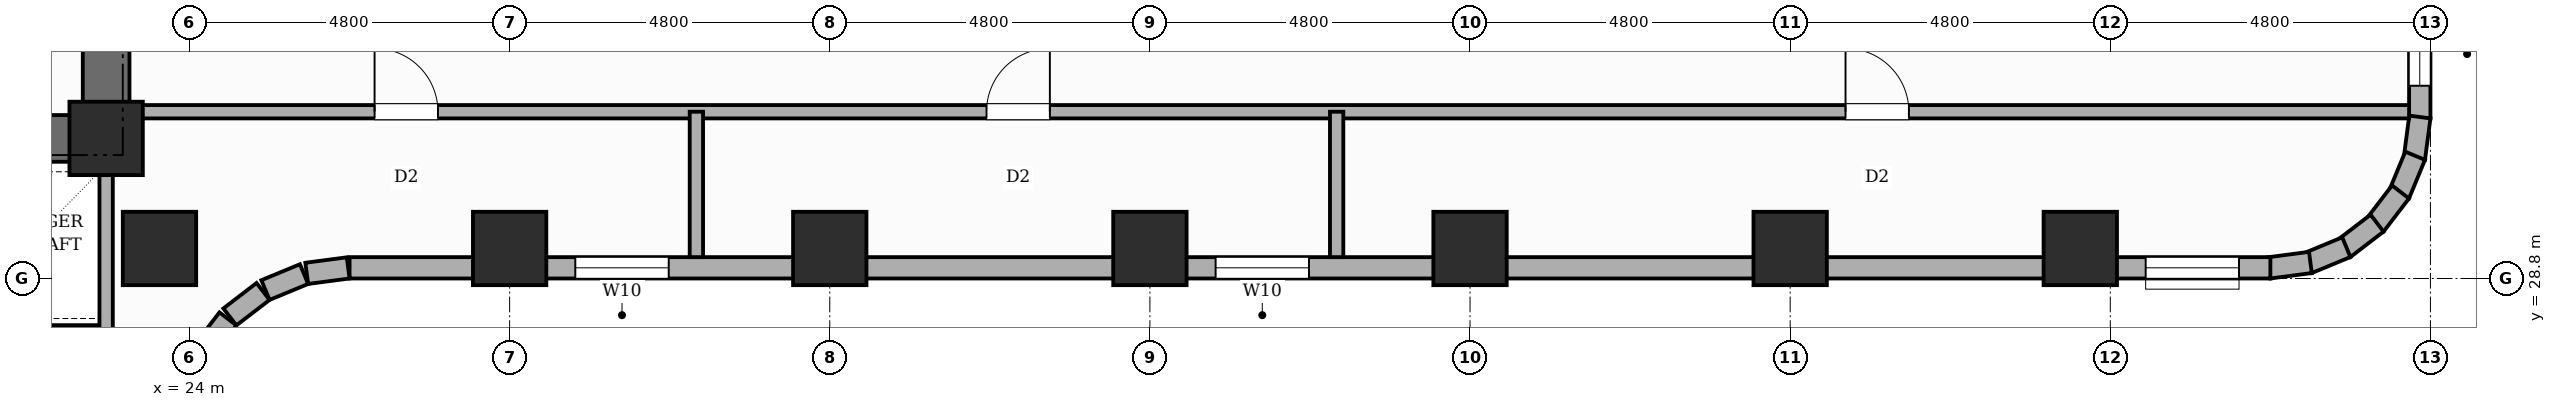
"""IFC4 building model, lengths in metres.
Left out: names, types, materials, properties, quantities, classifications, styles, units other than length and angle.
Written with IfcOpenShell. Run it as: python <this file> out.ifc"""

import sys

from ifc_helpers import new_model, si_unit, direction, frame, frame_2d, origin, origin_2d, place, context, subcontext, project, spatial, rectangle, extrude, element, fill, save


model = new_model("IFC4")
c1 = context("Model", 3, precision=1e-05, world=origin(), true_north=direction((0.0, 1.0)))
c2 = subcontext(c1, "Body", "Model", "MODEL_VIEW")
j1 = project(units=[si_unit("LENGTHUNIT", "METRE"), si_unit("PLANEANGLEUNIT", "RADIAN")], contexts=[c1])
p1 = place(None, origin())
s1 = spatial("IfcSite", under=j1, at=p1, CompositionType="ELEMENT")
p2 = place(p1, origin())
s2 = spatial("IfcBuilding", under=s1, at=p2, CompositionType="ELEMENT")
p3 = place(p2, frame((0.0, 0.0, 57.4)))
s3 = spatial("IfcBuildingStorey", under=s2, at=p3, CompositionType="ELEMENT", Elevation=57.4)
p4 = place(p3, frame((22.75, 30.55, 0.0), z_axis=(0.0, 0.0, 1.0), x_axis=(0.0, 1.0, 0.0)))
e1 = element("IfcWall", 1, at=p4, inside=s3, PredefinedType="SHEAR", context=c2, shape_type="SweptSolid", body=[
    extrude(rectangle(XDim=15.6, YDim=0.7, at=frame_2d((7.8, 0.0))), origin(), (0.0, 0.0, 1.0), 3.6),
])
p5 = place(p4, frame((10.8, 0.0, 0.0)))
e2 = element("IfcOpeningElement", 2, at=p5, cuts=e1, PredefinedType="OPENING", context=c2, shape_type="SweptSolid", body=[
    extrude(rectangle(XDim=1.0, YDim=2.15, at=frame_2d((0.5, 1.075))), frame((0.0, 0.36, 0.0), z_axis=(0.0, -1.0, 0.0), x_axis=(1.0, 0.0, 0.0)), (0.0, 0.0, 1.0), 0.72),
])
p6 = place(p3, frame((18.84, 30.9, 0.0), z_axis=(0.0, 0.0, 1.0), x_axis=(1.0, 0.0, 0.0)))
e3 = element("IfcWall", 3, at=p6, inside=s3, PredefinedType="SHEAR", context=c2, shape_type="SweptSolid", body=[
    extrude(rectangle(XDim=3.91, YDim=0.7, at=frame_2d((1.955, 0.0))), origin(), (0.0, 0.0, 1.0), 3.6),
])
for number, where, z_axis, x_axis in (
    (4, (22.75, 30.9, 0.0), (0.0, 0.0, 1.0), (1.0, 0.0, 0.0)),
    (5, (23.55, 29.25, 0.0), (0.0, 0.0, 1.0), (1.0, 0.0, 0.0)),
    (6, (28.8, 29.25, 0.0), (0.0, 0.0, 1.0), (1.0, 0.0, 0.0)),
    (7, (33.6, 29.25, 0.0), (0.0, 0.0, 1.0), (1.0, 0.0, 0.0)),
    (8, (38.4, 29.25, 0.0), (0.0, 0.0, 1.0), (1.0, 0.0, 0.0)),
    (9, (43.2, 29.25, 0.0), (0.0, 0.0, 1.0), (1.0, 0.0, 0.0)),
    (10, (48.0, 29.25, 0.0), (0.0, 0.0, 1.0), (1.0, 0.0, 0.0)),
    (11, (52.35, 29.25, 0.0), (0.0, 0.0, 1.0), (1.0, 0.0, 0.0)),
):
    element("IfcColumn", number, at=place(p3, frame(where, z_axis=z_axis, x_axis=x_axis)), inside=s3, PredefinedType="COLUMN", context=c2, shape_type="SweptSolid", body=[
        extrude(rectangle(XDim=1.1, YDim=1.1, at=origin_2d()), origin(), (0.0, 0.0, 1.0), 3.6),
    ])
p7 = place(p3, frame((57.44, 45.6, 0.0), z_axis=(0.0, 0.0, 1.0), x_axis=(0.0, -1.0, 0.0)))
e12 = element("IfcWall", 12, at=p7, inside=s3, PredefinedType="STANDARD", context=c2, shape_type="SweptSolid", body=[
    extrude(rectangle(XDim=14.4, YDim=0.32, at=frame_2d((7.2, 0.0))), origin(), (0.0, 0.0, 1.0), 2.53),
])
p8 = place(p7, frame((3.75, 0.0, 0.0)))
e13 = element("IfcOpeningElement", 13, at=p8, cuts=e12, PredefinedType="OPENING", context=c2, shape_type="SweptSolid", body=[
    extrude(rectangle(XDim=1.1, YDim=2.15, at=frame_2d((0.55, 1.075))), frame((0.0, 0.17, 0.0), z_axis=(0.0, -1.0, 0.0), x_axis=(1.0, 0.0, 0.0)), (0.0, 0.0, 1.0), 0.34),
])
p9 = place(p7, frame((0.47, 0.0, 0.45)))
e14 = element("IfcOpeningElement", 14, at=p9, cuts=e12, PredefinedType="OPENING", context=c2, shape_type="SweptSolid", body=[
    extrude(rectangle(XDim=0.95, YDim=1.8, at=frame_2d((0.475, 0.9))), frame((0.0, 0.17, 0.0), z_axis=(0.0, -1.0, 0.0), x_axis=(1.0, 0.0, 0.0)), (0.0, 0.0, 1.0), 0.34),
])
p10 = place(p7, frame((12.96, 0.0, 0.45)))
e15 = element("IfcOpeningElement", 15, at=p10, cuts=e12, PredefinedType="OPENING", context=c2, shape_type="SweptSolid", body=[
    extrude(rectangle(XDim=0.95, YDim=1.8, at=frame_2d((0.475, 0.9))), frame((0.0, 0.17, 0.0), z_axis=(0.0, -1.0, 0.0), x_axis=(1.0, 0.0, 0.0)), (0.0, 0.0, 1.0), 0.34),
])
p11 = place(p7, frame((9.312, 0.0, 0.65)))
e16 = element("IfcOpeningElement", 16, at=p11, cuts=e12, PredefinedType="OPENING", context=c2, shape_type="SweptSolid", body=[
    extrude(rectangle(XDim=1.4, YDim=1.1, at=frame_2d((0.7, 0.55))), frame((0.0, 0.17, 0.0), z_axis=(0.0, -1.0, 0.0), x_axis=(1.0, 0.0, 0.0)), (0.0, 0.0, 1.0), 0.34),
])
p12 = place(p7, frame((5.407, 0.0, 0.45)))
e17 = element("IfcOpeningElement", 17, at=p12, cuts=e12, PredefinedType="OPENING", context=c2, shape_type="SweptSolid", body=[
    extrude(rectangle(XDim=0.95, YDim=1.8, at=frame_2d((0.475, 0.9))), frame((0.0, 0.17, 0.0), z_axis=(0.0, -1.0, 0.0), x_axis=(1.0, 0.0, 0.0)), (0.0, 0.0, 1.0), 0.34),
])
p13 = place(p3, frame((57.441, 31.221, 0.0), z_axis=(0.0, 0.0, 1.0), x_axis=(-0.130504898859, -0.991447664465, 0.0)))
e18 = element("IfcWall", 18, at=p13, inside=s3, PredefinedType="STANDARD", context=c2, shape_type="SweptSolid", body=[
    extrude(rectangle(XDim=0.627, YDim=0.32, at=frame_2d((0.313, 0.0))), origin(), (0.0, 0.0, 1.0), 3.35),
])
p14 = place(p3, frame((57.37, 30.64, 0.0), z_axis=(0.0, 0.0, 1.0), x_axis=(-0.382787856107, -0.923836271867, 0.0)))
e19 = element("IfcWall", 19, at=p14, inside=s3, PredefinedType="STANDARD", context=c2, shape_type="SweptSolid", body=[
    extrude(rectangle(XDim=0.626, YDim=0.32, at=frame_2d((0.313, 0.0))), origin(), (0.0, 0.0, 1.0), 3.35),
])
p15 = place(p3, frame((57.152, 30.097, 0.0), z_axis=(0.0, 0.0, 1.0), x_axis=(-0.608693302629, -0.793405610854, 0.0)))
e20 = element("IfcWall", 20, at=p15, inside=s3, PredefinedType="STANDARD", context=c2, shape_type="SweptSolid", body=[
    extrude(rectangle(XDim=0.626, YDim=0.32, at=frame_2d((0.313, 0.0))), origin(), (0.0, 0.0, 1.0), 3.35),
])
p16 = place(p3, frame((56.8, 29.63, 0.0), z_axis=(0.0, 0.0, 1.0), x_axis=(-0.793361818833, -0.608750379399, 0.0)))
e21 = element("IfcWall", 21, at=p16, inside=s3, PredefinedType="STANDARD", context=c2, shape_type="SweptSolid", body=[
    extrude(rectangle(XDim=0.627, YDim=0.32, at=frame_2d((0.313, 0.0))), origin(), (0.0, 0.0, 1.0), 3.35),
])
for number, where, z_axis, x_axis in (
    (22, (56.339, 29.269, 0.0), (0.0, 0.0, 1.0), (-0.924, -0.383, 0.0)),
    (23, (55.8, 29.04, 0.0), (0.0, 0.0, 1.0), (-0.991, -0.131, 0.0)),
):
    element("IfcWall", number, at=place(p3, frame(where, z_axis=z_axis, x_axis=x_axis)), inside=s3, PredefinedType="STANDARD", context=c2, shape_type="SweptSolid", body=[
        extrude(rectangle(XDim=0.626, YDim=0.32, at=frame_2d((0.313, 0.0))), origin(), (0.0, 0.0, 1.0), 3.35),
    ])
p17 = place(p3, frame((55.2, 28.96, 0.0), z_axis=(0.0, 0.0, 1.0), x_axis=(-1.0, 0.0, 0.0)))
e24 = element("IfcWall", 24, at=p17, inside=s3, PredefinedType="STANDARD", context=c2, shape_type="SweptSolid", body=[
    extrude(rectangle(XDim=28.8, YDim=0.32, at=frame_2d((14.4, 0.0))), origin(), (0.0, 0.0, 1.0), 2.53),
])
p18 = place(p17, frame((24.015, 0.0, 0.65)))
e25 = element("IfcOpeningElement", 25, at=p18, cuts=e24, PredefinedType="OPENING", context=c2, shape_type="SweptSolid", body=[
    extrude(rectangle(XDim=1.4, YDim=1.1, at=frame_2d((0.7, 0.55))), frame((0.0, 0.17, 0.0), z_axis=(0.0, -1.0, 0.0), x_axis=(1.0, 0.0, 0.0)), (0.0, 0.0, 1.0), 0.34),
])
p19 = place(p17, frame((14.415, 0.0, 0.65)))
e26 = element("IfcOpeningElement", 26, at=p19, cuts=e24, PredefinedType="OPENING", context=c2, shape_type="SweptSolid", body=[
    extrude(rectangle(XDim=1.4, YDim=1.1, at=frame_2d((0.7, 0.55))), frame((0.0, 0.17, 0.0), z_axis=(0.0, -1.0, 0.0), x_axis=(1.0, 0.0, 0.0)), (0.0, 0.0, 1.0), 0.34),
])
p20 = place(p17, frame((0.47, 0.0, 0.65)))
e27 = element("IfcOpeningElement", 27, at=p20, cuts=e24, PredefinedType="OPENING", context=c2, shape_type="SweptSolid", body=[
    extrude(rectangle(XDim=1.4, YDim=1.1, at=frame_2d((0.7, 0.55))), frame((0.0, 0.17, 0.0), z_axis=(0.0, -1.0, 0.0), x_axis=(1.0, 0.0, 0.0)), (0.0, 0.0, 1.0), 0.34),
])
p21 = place(p3, frame((26.379, 28.958, 0.0), z_axis=(0.0, 0.0, 1.0), x_axis=(-0.991447664465, -0.130504898859, 0.0)))
e28 = element("IfcWall", 28, at=p21, inside=s3, PredefinedType="STANDARD", context=c2, shape_type="SweptSolid", body=[
    extrude(rectangle(XDim=0.627, YDim=0.32, at=frame_2d((0.313, 0.0))), origin(), (0.0, 0.0, 1.0), 2.53),
])
p22 = place(p3, frame((25.718, 28.866, 0.0), z_axis=(0.0, 0.0, 1.0), x_axis=(-0.923836271867, -0.382787856107, 0.0)))
e29 = element("IfcWall", 29, at=p22, inside=s3, PredefinedType="STANDARD", context=c2, shape_type="SweptSolid", body=[
    extrude(rectangle(XDim=0.626, YDim=0.32, at=frame_2d((0.313, 0.0))), origin(), (0.0, 0.0, 1.0), 3.35),
])
for number, where, z_axis, x_axis in (
    (30, (25.103, 28.605, 0.0), (0.0, 0.0, 1.0), (-0.793, -0.609, 0.0)),
    (31, (24.576, 28.195, 0.0), (0.0, 0.0, 1.0), (-0.609, -0.793, 0.0)),
):
    element("IfcWall", number, at=place(p3, frame(where, z_axis=z_axis, x_axis=x_axis)), inside=s3, PredefinedType="STANDARD", context=c2, shape_type="SweptSolid", body=[
        extrude(rectangle(XDim=0.626, YDim=0.32, at=frame_2d((0.313, 0.0))), origin(), (0.0, 0.0, 1.0), 3.35),
    ])
p23 = place(p3, frame((15.5, 28.0, 0.0), z_axis=(0.0, 0.0, 1.0), x_axis=(1.0, 0.0, 0.0)))
e32 = element("IfcWall", 32, at=p23, inside=s3, PredefinedType="POLYGONAL", context=c2, shape_type="SweptSolid", body=[
    extrude(rectangle(XDim=7.25, YDim=0.2, at=frame_2d((3.625, 0.0))), origin(), (0.0, 0.0, 1.0), 3.35),
])
p24 = place(p3, frame((22.75, 27.9, 0.0), z_axis=(0.0, 0.0, 1.0), x_axis=(0.0, 1.0, 0.0)))
e33 = element("IfcWall", 33, at=p24, inside=s3, PredefinedType="POLYGONAL", context=c2, shape_type="SweptSolid", body=[
    extrude(rectangle(XDim=3.0, YDim=0.2, at=frame_2d((1.5, 0.0))), origin(), (0.0, 0.0, 1.0), 3.35),
])
p25 = place(p3, frame((22.75, 31.3, 0.0), z_axis=(0.0, 0.0, 1.0), x_axis=(1.0, 0.0, 0.0)))
e34 = element("IfcWall", 34, at=p25, inside=s3, PredefinedType="PARTITIONING", context=c2, shape_type="SweptSolid", body=[
    extrude(rectangle(XDim=34.53, YDim=0.2, at=frame_2d((17.265, 0.0))), origin(), (0.0, 0.0, 1.0), 3.35),
])
p26 = place(p25, frame((4.025, 0.0, 0.0)))
e35 = element("IfcOpeningElement", 35, at=p26, cuts=e34, PredefinedType="OPENING", context=c2, shape_type="SweptSolid", body=[
    extrude(rectangle(XDim=0.95, YDim=2.15, at=frame_2d((0.475, 1.075))), frame((0.0, 0.11, 0.0), z_axis=(0.0, -1.0, 0.0), x_axis=(1.0, 0.0, 0.0)), (0.0, 0.0, 1.0), 0.22),
])
p27 = place(p25, frame((13.2, 0.0, 0.0)))
e36 = element("IfcOpeningElement", 36, at=p27, cuts=e34, PredefinedType="OPENING", context=c2, shape_type="SweptSolid", body=[
    extrude(rectangle(XDim=0.95, YDim=2.15, at=frame_2d((0.475, 1.075))), frame((0.0, 0.11, 0.0), z_axis=(0.0, -1.0, 0.0), x_axis=(1.0, 0.0, 0.0)), (0.0, 0.0, 1.0), 0.22),
])
p28 = place(p25, frame((26.08, 0.0, 0.0)))
e37 = element("IfcOpeningElement", 37, at=p28, cuts=e34, PredefinedType="OPENING", context=c2, shape_type="SweptSolid", body=[
    extrude(rectangle(XDim=0.95, YDim=2.15, at=frame_2d((0.475, 1.075))), frame((0.0, 0.11, 0.0), z_axis=(0.0, -1.0, 0.0), x_axis=(1.0, 0.0, 0.0)), (0.0, 0.0, 1.0), 0.22),
])
for number, where, z_axis, x_axis in (
    (38, (31.6, 29.12, 0.0), (0.0, 0.0, 1.0), (0.0, 1.0, 0.0)),
    (39, (41.2, 29.12, 0.0), (0.0, 0.0, 1.0), (0.0, 1.0, 0.0)),
):
    element("IfcWall", number, at=place(p3, frame(where, z_axis=z_axis, x_axis=x_axis)), inside=s3, PredefinedType="SOLIDWALL", context=c2, shape_type="SweptSolid", body=[
        extrude(rectangle(XDim=2.18, YDim=0.2, at=frame_2d((1.09, 0.0))), origin(), (0.0, 0.0, 1.0), 3.35),
    ])
p29 = place(p10, origin())
e40 = element("IfcWindow", 40, at=p29, inside=s3, PartitioningType="SINGLE_PANEL", PredefinedType="WINDOW", context=c2, shape_type="SweptSolid", body=[
    extrude(rectangle(XDim=0.95, YDim=1.8, at=frame_2d((0.475, 0.9))), frame((0.0, 0.03, 0.0), z_axis=(0.0, -1.0, 0.0), x_axis=(1.0, 0.0, 0.0)), (0.0, 0.0, 1.0), 0.06),
])
fill(e15, e40)
p30 = place(p18, origin())
e41 = element("IfcWindow", 41, at=p30, inside=s3, PartitioningType="SINGLE_PANEL", PredefinedType="WINDOW", context=c2, shape_type="SweptSolid", body=[
    extrude(rectangle(XDim=1.4, YDim=1.1, at=frame_2d((0.7, 0.55))), frame((0.0, 0.03, 0.0), z_axis=(0.0, -1.0, 0.0), x_axis=(1.0, 0.0, 0.0)), (0.0, 0.0, 1.0), 0.06),
])
fill(e25, e41)
p31 = place(p19, origin())
e42 = element("IfcWindow", 42, at=p31, inside=s3, PartitioningType="SINGLE_PANEL", PredefinedType="WINDOW", context=c2, shape_type="SweptSolid", body=[
    extrude(rectangle(XDim=1.4, YDim=1.1, at=frame_2d((0.7, 0.55))), frame((0.0, 0.03, 0.0), z_axis=(0.0, -1.0, 0.0), x_axis=(1.0, 0.0, 0.0)), (0.0, 0.0, 1.0), 0.06),
])
fill(e26, e42)
p32 = place(p20, origin())
e43 = element("IfcWindow", 43, at=p32, inside=s3, PartitioningType="SINGLE_PANEL", PredefinedType="WINDOW", context=c2, shape_type="SweptSolid", body=[
    extrude(rectangle(XDim=1.4, YDim=1.1, at=frame_2d((0.7, 0.55))), frame((0.0, 0.03, 0.0), z_axis=(0.0, -1.0, 0.0), x_axis=(1.0, 0.0, 0.0)), (0.0, 0.0, 1.0), 0.06),
])
fill(e27, e43)
p33 = place(p26, origin())
e44 = element("IfcDoor", 44, at=p33, inside=s3, OperationType="SINGLE_SWING_LEFT", PredefinedType="DOOR", context=c2, shape_type="SweptSolid", body=[
    extrude(rectangle(XDim=0.95, YDim=2.15, at=frame_2d((0.475, 1.075))), frame((0.0, 0.025, 0.0), z_axis=(0.0, -1.0, 0.0), x_axis=(1.0, 0.0, 0.0)), (0.0, 0.0, 1.0), 0.05),
])
fill(e35, e44)
p34 = place(p27, origin())
e45 = element("IfcDoor", 45, at=p34, inside=s3, OperationType="SINGLE_SWING_RIGHT", PredefinedType="DOOR", context=c2, shape_type="SweptSolid", body=[
    extrude(rectangle(XDim=0.95, YDim=2.15, at=frame_2d((0.475, 1.075))), frame((0.0, 0.025, 0.0), z_axis=(0.0, -1.0, 0.0), x_axis=(1.0, 0.0, 0.0)), (0.0, 0.0, 1.0), 0.05),
])
fill(e36, e45)
p35 = place(p28, origin())
e46 = element("IfcDoor", 46, at=p35, inside=s3, OperationType="SINGLE_SWING_LEFT", PredefinedType="DOOR", context=c2, shape_type="SweptSolid", body=[
    extrude(rectangle(XDim=0.95, YDim=2.15, at=frame_2d((0.475, 1.075))), frame((0.0, 0.025, 0.0), z_axis=(0.0, -1.0, 0.0), x_axis=(1.0, 0.0, 0.0)), (0.0, 0.0, 1.0), 0.05),
])
fill(e37, e46)
save(model, sys.argv[1])
